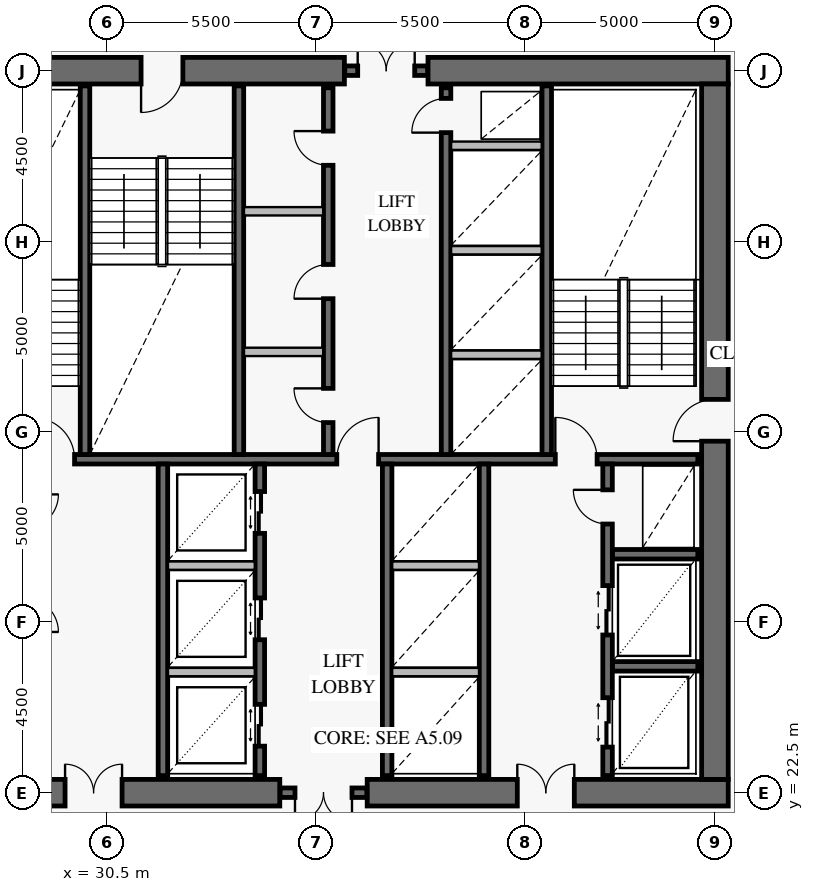
"""IFC4 building model, lengths in metres.
Left out: names, types, materials, properties, quantities, classifications, styles, units other than length and angle.
Written with IfcOpenShell. Run it as: python <this file> out.ifc"""

import sys

from ifc_helpers import new_model, si_unit, direction, frame, frame_2d, origin, place, context, subcontext, project, spatial, rectangle, extrude, element, fill, save


model = new_model("IFC4")
c1 = context("Model", 3, precision=1e-05, world=origin(), true_north=direction((0.0, 1.0)))
c2 = subcontext(c1, "Body", "Model", "MODEL_VIEW")
j1 = project(units=[si_unit("LENGTHUNIT", "METRE"), si_unit("PLANEANGLEUNIT", "RADIAN")], contexts=[c1])
p1 = place(None, origin())
s1 = spatial("IfcSite", under=j1, at=p1, CompositionType="ELEMENT")
p2 = place(p1, origin())
s2 = spatial("IfcBuilding", under=s1, at=p2, CompositionType="ELEMENT")
p3 = place(p2, frame((0.0, 0.0, 138.0)))
s3 = spatial("IfcBuildingStorey", under=s2, at=p3, CompositionType="ELEMENT", Elevation=138.0)
p4 = place(p3, frame((25.15, 22.5, 0.0), z_axis=(0.0, 0.0, 1.0), x_axis=(1.0, 0.0, 0.0)))
e1 = element("IfcWall", 1, at=p4, inside=s3, PredefinedType="SHEAR", context=c2, shape_type="SweptSolid", body=[
    extrude(rectangle(XDim=9.9, YDim=0.7, at=frame_2d((4.95, 0.0))), origin(), (0.0, 0.0, 1.0), 3.8),
])
p5 = place(p4, frame((4.25, 0.0, 0.0)))
e2 = element("IfcOpeningElement", 2, at=p5, cuts=e1, PredefinedType="OPENING", context=c2, shape_type="SweptSolid", body=[
    extrude(rectangle(XDim=1.5, YDim=2.15, at=frame_2d((0.75, 1.075))), frame((0.0, 0.362, 0.0), z_axis=(0.0, -1.0, 0.0), x_axis=(1.0, 0.0, 0.0)), (0.0, 0.0, 1.0), 0.724),
])
p6 = place(p3, frame((37.35, 22.5, 0.0), z_axis=(0.0, 0.0, 1.0), x_axis=(1.0, 0.0, 0.0)))
e3 = element("IfcWall", 3, at=p6, inside=s3, PredefinedType="SHEAR", context=c2, shape_type="SweptSolid", body=[
    extrude(rectangle(XDim=9.5, YDim=0.7, at=frame_2d((4.75, 0.0))), origin(), (0.0, 0.0, 1.0), 3.8),
])
p7 = place(p6, frame((3.95, 0.0, 0.0)))
e4 = element("IfcOpeningElement", 4, at=p7, cuts=e3, PredefinedType="OPENING", context=c2, shape_type="SweptSolid", body=[
    extrude(rectangle(XDim=1.5, YDim=2.15, at=frame_2d((0.75, 1.075))), frame((0.0, 0.362, 0.0), z_axis=(0.0, -1.0, 0.0), x_axis=(1.0, 0.0, 0.0)), (0.0, 0.0, 1.0), 0.724),
])
p8 = place(p3, frame((46.85, 41.5, 0.0), z_axis=(0.0, 0.0, 1.0), x_axis=(-1.0, 0.0, 0.0)))
e5 = element("IfcWall", 5, at=p8, inside=s3, PredefinedType="SHEAR", context=c2, shape_type="SweptSolid", body=[
    extrude(rectangle(XDim=7.9, YDim=0.7, at=frame_2d((3.95, 0.0))), origin(), (0.0, 0.0, 1.0), 3.8),
])
p9 = place(p3, frame((36.75, 41.5, 0.0), z_axis=(0.0, 0.0, 1.0), x_axis=(-1.0, 0.0, 0.0)))
e6 = element("IfcWall", 6, at=p9, inside=s3, PredefinedType="SHEAR", context=c2, shape_type="SweptSolid", body=[
    extrude(rectangle(XDim=11.6, YDim=0.7, at=frame_2d((5.8, 0.0))), origin(), (0.0, 0.0, 1.0), 3.8),
])
p10 = place(p9, frame((4.25, 0.0, 0.0)))
e7 = element("IfcOpeningElement", 7, at=p10, cuts=e6, PredefinedType="OPENING", context=c2, shape_type="SweptSolid", body=[
    extrude(rectangle(XDim=1.1, YDim=2.15, at=frame_2d((0.55, 1.075))), frame((0.0, 0.362, 0.0), z_axis=(0.0, -1.0, 0.0), x_axis=(1.0, 0.0, 0.0)), (0.0, 0.0, 1.0), 0.724),
])
p11 = place(p3, frame((46.5, 22.85, 0.0), z_axis=(0.0, 0.0, 1.0), x_axis=(0.0, 1.0, 0.0)))
e8 = element("IfcWall", 8, at=p11, inside=s3, PredefinedType="SHEAR", context=c2, shape_type="SweptSolid", body=[
    extrude(rectangle(XDim=18.3, YDim=0.7, at=frame_2d((9.15, 0.0))), origin(), (0.0, 0.0, 1.0), 3.8),
])
p12 = place(p11, frame((8.9, 0.0, 0.0)))
e9 = element("IfcOpeningElement", 9, at=p12, cuts=e8, PredefinedType="OPENING", context=c2, shape_type="SweptSolid", body=[
    extrude(rectangle(XDim=1.1, YDim=2.15, at=frame_2d((0.55, 1.075))), frame((0.0, 0.362, 0.0), z_axis=(0.0, -1.0, 0.0), x_axis=(1.0, 0.0, 0.0)), (0.0, 0.0, 1.0), 0.724),
])
p13 = place(p3, frame((35.06, 22.5, 0.0), z_axis=(0.0, 0.0, 1.0), x_axis=(1.0, 0.0, 0.0)))
e10 = element("IfcWall", 10, at=p13, inside=s3, PredefinedType="SOLIDWALL", context=c2, shape_type="SweptSolid", body=[
    extrude(rectangle(XDim=2.28, YDim=0.25, at=frame_2d((1.14, 0.0))), origin(), (0.0, 0.0, 1.0), 3.8),
])
p14 = place(p13, frame((0.39, 0.0, 0.0)))
e11 = element("IfcOpeningElement", 11, at=p14, cuts=e10, PredefinedType="OPENING", context=c2, shape_type="SweptSolid", body=[
    extrude(rectangle(XDim=1.5, YDim=2.15, at=frame_2d((0.75, 1.075))), frame((0.0, 0.137, 0.0), z_axis=(0.0, -1.0, 0.0), x_axis=(1.0, 0.0, 0.0)), (0.0, 0.0, 1.0), 0.274),
])
p15 = place(p3, frame((36.76, 41.5, 0.0), z_axis=(0.0, 0.0, 1.0), x_axis=(1.0, 0.0, 0.0)))
e12 = element("IfcWall", 12, at=p15, inside=s3, PredefinedType="SOLIDWALL", context=c2, shape_type="SweptSolid", body=[
    extrude(rectangle(XDim=2.18, YDim=0.25, at=frame_2d((1.09, 0.0))), origin(), (0.0, 0.0, 1.0), 3.8),
])
p16 = place(p15, frame((0.34, 0.0, 0.0)))
e13 = element("IfcOpeningElement", 13, at=p16, cuts=e12, PredefinedType="OPENING", context=c2, shape_type="SweptSolid", body=[
    extrude(rectangle(XDim=1.5, YDim=2.15, at=frame_2d((0.75, 1.075))), frame((0.0, 0.137, 0.0), z_axis=(0.0, -1.0, 0.0), x_axis=(1.0, 0.0, 0.0)), (0.0, 0.0, 1.0), 0.274),
])
p17 = place(p3, frame((25.95, 31.275, 0.0), z_axis=(0.0, 0.0, 1.0), x_axis=(1.0, 0.0, 0.0)))
e14 = element("IfcWall", 14, at=p17, inside=s3, PredefinedType="SOLIDWALL", context=c2, shape_type="SweptSolid", body=[
    extrude(rectangle(XDim=20.1, YDim=0.25, at=frame_2d((10.05, 0.0))), origin(), (0.0, 0.0, 1.0), 3.8),
])
p18 = place(p17, frame((2.6, 0.0, 0.0)))
e15 = element("IfcOpeningElement", 15, at=p18, cuts=e14, PredefinedType="OPENING", context=c2, shape_type="SweptSolid", body=[
    extrude(rectangle(XDim=1.1, YDim=2.15, at=frame_2d((0.55, 1.075))), frame((0.0, 0.137, 0.0), z_axis=(0.0, -1.0, 0.0), x_axis=(1.0, 0.0, 0.0)), (0.0, 0.0, 1.0), 0.274),
])
p19 = place(p17, frame((10.6, 0.0, 0.0)))
e16 = element("IfcOpeningElement", 16, at=p19, cuts=e14, PredefinedType="OPENING", context=c2, shape_type="SweptSolid", body=[
    extrude(rectangle(XDim=1.1, YDim=2.15, at=frame_2d((0.55, 1.075))), frame((0.0, 0.137, 0.0), z_axis=(0.0, -1.0, 0.0), x_axis=(1.0, 0.0, 0.0)), (0.0, 0.0, 1.0), 0.274),
])
p20 = place(p17, frame((16.35, 0.0, 0.0)))
e17 = element("IfcOpeningElement", 17, at=p20, cuts=e14, PredefinedType="OPENING", context=c2, shape_type="SweptSolid", body=[
    extrude(rectangle(XDim=1.1, YDim=2.15, at=frame_2d((0.55, 1.075))), frame((0.0, 0.137, 0.0), z_axis=(0.0, -1.0, 0.0), x_axis=(1.0, 0.0, 0.0)), (0.0, 0.0, 1.0), 0.274),
])
for number, where, z_axis, x_axis in (
    (18, (29.925, 31.4, 0.0), (0.0, 0.0, 1.0), (0.0, 1.0, 0.0)),
    (19, (33.975, 31.4, 0.0), (0.0, 0.0, 1.0), (0.0, 1.0, 0.0)),
    (20, (42.075, 31.4, 0.0), (0.0, 0.0, 1.0), (0.0, 1.0, 0.0)),
):
    element("IfcWall", number, at=place(p3, frame(where, z_axis=z_axis, x_axis=x_axis)), inside=s3, PredefinedType="SOLIDWALL", context=c2, shape_type="SweptSolid", body=[
        extrude(rectangle(XDim=9.7, YDim=0.25, at=frame_2d((4.85, 0.0))), origin(), (0.0, 0.0, 1.0), 3.8),
    ])
p21 = place(p3, frame((36.325, 31.4, 0.0), z_axis=(0.0, 0.0, 1.0), x_axis=(0.0, 1.0, 0.0)))
e21 = element("IfcWall", 21, at=p21, inside=s3, PredefinedType="SOLIDWALL", context=c2, shape_type="SweptSolid", body=[
    extrude(rectangle(XDim=9.65, YDim=0.25, at=frame_2d((4.825, 0.0))), origin(), (0.0, 0.0, 1.0), 3.8),
])
p22 = place(p21, frame((0.84, 0.0, 0.0)))
e22 = element("IfcOpeningElement", 22, at=p22, cuts=e21, PredefinedType="OPENING", context=c2, shape_type="SweptSolid", body=[
    extrude(rectangle(XDim=0.9, YDim=2.1, at=frame_2d((0.45, 1.05))), frame((0.0, 0.137, 0.0), z_axis=(0.0, -1.0, 0.0), x_axis=(1.0, 0.0, 0.0)), (0.0, 0.0, 1.0), 0.274),
])
p23 = place(p21, frame((4.1, 0.0, 0.0)))
e23 = element("IfcOpeningElement", 23, at=p23, cuts=e21, PredefinedType="OPENING", context=c2, shape_type="SweptSolid", body=[
    extrude(rectangle(XDim=0.9, YDim=2.1, at=frame_2d((0.45, 1.05))), frame((0.0, 0.137, 0.0), z_axis=(0.0, -1.0, 0.0), x_axis=(1.0, 0.0, 0.0)), (0.0, 0.0, 1.0), 0.274),
])
p24 = place(p21, frame((7.61, 0.0, 0.0)))
e24 = element("IfcOpeningElement", 24, at=p24, cuts=e21, PredefinedType="OPENING", context=c2, shape_type="SweptSolid", body=[
    extrude(rectangle(XDim=0.9, YDim=2.1, at=frame_2d((0.45, 1.05))), frame((0.0, 0.137, 0.0), z_axis=(0.0, -1.0, 0.0), x_axis=(1.0, 0.0, 0.0)), (0.0, 0.0, 1.0), 0.274),
])
p25 = place(p3, frame((39.425, 31.4, 0.0), z_axis=(0.0, 0.0, 1.0), x_axis=(0.0, 1.0, 0.0)))
e25 = element("IfcWall", 25, at=p25, inside=s3, PredefinedType="SOLIDWALL", context=c2, shape_type="SweptSolid", body=[
    extrude(rectangle(XDim=9.65, YDim=0.25, at=frame_2d((4.825, 0.0))), origin(), (0.0, 0.0, 1.0), 3.8),
])
p26 = place(p25, frame((8.47, 0.0, 0.0)))
e26 = element("IfcOpeningElement", 26, at=p26, cuts=e25, PredefinedType="OPENING", context=c2, shape_type="SweptSolid", body=[
    extrude(rectangle(XDim=0.9, YDim=2.1, at=frame_2d((0.45, 1.05))), frame((0.0, 0.137, 0.0), z_axis=(0.0, -1.0, 0.0), x_axis=(1.0, 0.0, 0.0)), (0.0, 0.0, 1.0), 0.274),
])
p27 = place(p3, frame((31.975, 22.95, 0.0), z_axis=(0.0, 0.0, 1.0), x_axis=(0.0, 1.0, 0.0)))
e27 = element("IfcWall", 27, at=p27, inside=s3, PredefinedType="SOLIDWALL", context=c2, shape_type="SweptSolid", body=[
    extrude(rectangle(XDim=8.2, YDim=0.25, at=frame_2d((4.1, 0.0))), origin(), (0.0, 0.0, 1.0), 3.8),
])
p28 = place(p3, frame((34.525, 22.95, 0.0), z_axis=(0.0, 0.0, 1.0), x_axis=(0.0, 1.0, 0.0)))
e28 = element("IfcWall", 28, at=p28, inside=s3, PredefinedType="SOLIDWALL", context=c2, shape_type="SweptSolid", body=[
    extrude(rectangle(XDim=8.2, YDim=0.25, at=frame_2d((4.1, 0.0))), origin(), (0.0, 0.0, 1.0), 3.8),
])
p29 = place(p28, frame((0.775, 0.0, 0.0)))
e29 = element("IfcOpeningElement", 29, at=p29, cuts=e28, PredefinedType="OPENING", context=c2, shape_type="SweptSolid", body=[
    extrude(rectangle(XDim=1.1, YDim=2.2, at=frame_2d((0.55, 1.1))), frame((0.0, 0.137, 0.0), z_axis=(0.0, -1.0, 0.0), x_axis=(1.0, 0.0, 0.0)), (0.0, 0.0, 1.0), 0.274),
])
p30 = place(p28, frame((3.575, 0.0, 0.0)))
e30 = element("IfcOpeningElement", 30, at=p30, cuts=e28, PredefinedType="OPENING", context=c2, shape_type="SweptSolid", body=[
    extrude(rectangle(XDim=1.1, YDim=2.2, at=frame_2d((0.55, 1.1))), frame((0.0, 0.137, 0.0), z_axis=(0.0, -1.0, 0.0), x_axis=(1.0, 0.0, 0.0)), (0.0, 0.0, 1.0), 0.274),
])
p31 = place(p28, frame((6.375, 0.0, 0.0)))
e31 = element("IfcOpeningElement", 31, at=p31, cuts=e28, PredefinedType="OPENING", context=c2, shape_type="SweptSolid", body=[
    extrude(rectangle(XDim=1.1, YDim=2.2, at=frame_2d((0.55, 1.1))), frame((0.0, 0.137, 0.0), z_axis=(0.0, -1.0, 0.0), x_axis=(1.0, 0.0, 0.0)), (0.0, 0.0, 1.0), 0.274),
])
for number, where, z_axis, x_axis in (
    (32, (37.875, 22.95, 0.0), (0.0, 0.0, 1.0), (0.0, 1.0, 0.0)),
    (33, (40.425, 22.95, 0.0), (0.0, 0.0, 1.0), (0.0, 1.0, 0.0)),
):
    element("IfcWall", number, at=place(p3, frame(where, z_axis=z_axis, x_axis=x_axis)), inside=s3, PredefinedType="SOLIDWALL", context=c2, shape_type="SweptSolid", body=[
        extrude(rectangle(XDim=8.2, YDim=0.25, at=frame_2d((4.1, 0.0))), origin(), (0.0, 0.0, 1.0), 3.8),
    ])
for number, where, z_axis, x_axis in (
    (34, (43.8, 25.825, 0.0), (0.0, 0.0, 1.0), (1.0, 0.0, 0.0)),
    (35, (43.8, 28.775, 0.0), (0.0, 0.0, 1.0), (1.0, 0.0, 0.0)),
):
    element("IfcWall", number, at=place(p3, frame(where, z_axis=z_axis, x_axis=x_axis)), inside=s3, PredefinedType="SOLIDWALL", context=c2, shape_type="SweptSolid", body=[
        extrude(rectangle(XDim=2.25, YDim=0.25, at=frame_2d((1.125, 0.0))), origin(), (0.0, 0.0, 1.0), 3.8),
    ])
p32 = place(p3, frame((43.675, 22.95, 0.0), z_axis=(0.0, 0.0, 1.0), x_axis=(0.0, 1.0, 0.0)))
e36 = element("IfcWall", 36, at=p32, inside=s3, PredefinedType="SOLIDWALL", context=c2, shape_type="SweptSolid", body=[
    extrude(rectangle(XDim=8.2, YDim=0.25, at=frame_2d((4.1, 0.0))), origin(), (0.0, 0.0, 1.0), 3.8),
])
p33 = place(p32, frame((0.75, 0.0, 0.0)))
e37 = element("IfcOpeningElement", 37, at=p33, cuts=e36, PredefinedType="OPENING", context=c2, shape_type="SweptSolid", body=[
    extrude(rectangle(XDim=1.3, YDim=2.3, at=frame_2d((0.65, 1.15))), frame((0.0, 0.137, 0.0), z_axis=(0.0, -1.0, 0.0), x_axis=(1.0, 0.0, 0.0)), (0.0, 0.0, 1.0), 0.274),
])
p34 = place(p32, frame((3.7, 0.0, 0.0)))
e38 = element("IfcOpeningElement", 38, at=p34, cuts=e36, PredefinedType="OPENING", context=c2, shape_type="SweptSolid", body=[
    extrude(rectangle(XDim=1.3, YDim=2.3, at=frame_2d((0.65, 1.15))), frame((0.0, 0.137, 0.0), z_axis=(0.0, -1.0, 0.0), x_axis=(1.0, 0.0, 0.0)), (0.0, 0.0, 1.0), 0.274),
])
p35 = place(p32, frame((6.62, 0.0, 0.0)))
e39 = element("IfcOpeningElement", 39, at=p35, cuts=e36, PredefinedType="OPENING", context=c2, shape_type="SweptSolid", body=[
    extrude(rectangle(XDim=0.9, YDim=2.1, at=frame_2d((0.45, 1.05))), frame((0.0, 0.137, 0.0), z_axis=(0.0, -1.0, 0.0), x_axis=(1.0, 0.0, 0.0)), (0.0, 0.0, 1.0), 0.274),
])
for number, where, z_axis, x_axis in (
    (40, (34.108, 34.1, 0.0), (0.0, 0.0, 1.0), (1.0, 0.0, 0.0)),
    (41, (34.108, 37.8, 0.0), (0.0, 0.0, 1.0), (1.0, 0.0, 0.0)),
):
    element("IfcWall", number, at=place(p3, frame(where, z_axis=z_axis, x_axis=x_axis)), inside=s3, PredefinedType="PARTITIONING", context=c2, shape_type="SweptSolid", body=[
        extrude(rectangle(XDim=2.084, YDim=0.22, at=frame_2d((1.042, 0.0))), origin(), (0.0, 0.0, 1.0), 3.55),
    ])
for number, where, z_axis, x_axis in (
    (42, (39.558, 34.025, 0.0), (0.0, 0.0, 1.0), (1.0, 0.0, 0.0)),
    (43, (39.558, 36.775, 0.0), (0.0, 0.0, 1.0), (1.0, 0.0, 0.0)),
    (44, (39.558, 39.525, 0.0), (0.0, 0.0, 1.0), (1.0, 0.0, 0.0)),
):
    element("IfcWall", number, at=place(p3, frame(where, z_axis=z_axis, x_axis=x_axis)), inside=s3, PredefinedType="PARTITIONING", context=c2, shape_type="SweptSolid", body=[
        extrude(rectangle(XDim=2.384, YDim=0.22, at=frame_2d((1.192, 0.0))), origin(), (0.0, 0.0, 1.0), 3.55),
    ])
for number, where, z_axis, x_axis in (
    (45, (32.108, 25.675, 0.0), (0.0, 0.0, 1.0), (1.0, 0.0, 0.0)),
    (46, (32.108, 28.475, 0.0), (0.0, 0.0, 1.0), (1.0, 0.0, 0.0)),
):
    element("IfcWall", number, at=place(p3, frame(where, z_axis=z_axis, x_axis=x_axis)), inside=s3, PredefinedType="PARTITIONING", context=c2, shape_type="SweptSolid", body=[
        extrude(rectangle(XDim=2.284, YDim=0.22, at=frame_2d((1.142, 0.0))), origin(), (0.0, 0.0, 1.0), 3.55),
    ])
for number, where, z_axis, x_axis in (
    (47, (38.008, 25.675, 0.0), (0.0, 0.0, 1.0), (1.0, 0.0, 0.0)),
    (48, (38.008, 28.475, 0.0), (0.0, 0.0, 1.0), (1.0, 0.0, 0.0)),
):
    element("IfcWall", number, at=place(p3, frame(where, z_axis=z_axis, x_axis=x_axis)), inside=s3, PredefinedType="PARTITIONING", context=c2, shape_type="SweptSolid", body=[
        extrude(rectangle(XDim=2.284, YDim=0.22, at=frame_2d((1.142, 0.0))), origin(), (0.0, 0.0, 1.0), 3.55),
    ])
p36 = place(p12, origin())
e49 = element("IfcDoor", 49, at=p36, inside=s3, OperationType="SINGLE_SWING_LEFT", PredefinedType="USERDEFINED", context=c2, shape_type="SweptSolid", body=[
    extrude(rectangle(XDim=1.1, YDim=2.15, at=frame_2d((0.55, 1.075))), frame((0.0, 0.025, 0.0), z_axis=(0.0, -1.0, 0.0), x_axis=(1.0, 0.0, 0.0)), (0.0, 0.0, 1.0), 0.05),
])
fill(e9, e49)
p37 = place(p10, origin())
e50 = element("IfcDoor", 50, at=p37, inside=s3, OperationType="SINGLE_SWING_RIGHT", PredefinedType="USERDEFINED", context=c2, shape_type="SweptSolid", body=[
    extrude(rectangle(XDim=1.1, YDim=2.15, at=frame_2d((0.55, 1.075))), frame((0.0, 0.025, 0.0), z_axis=(0.0, -1.0, 0.0), x_axis=(1.0, 0.0, 0.0)), (0.0, 0.0, 1.0), 0.05),
])
fill(e7, e50)
p38 = place(p5, origin())
e51 = element("IfcDoor", 51, at=p38, inside=s3, OperationType="DOUBLE_DOOR_SINGLE_SWING", PredefinedType="DOOR", context=c2, shape_type="SweptSolid", body=[
    extrude(rectangle(XDim=1.5, YDim=2.15, at=frame_2d((0.75, 1.075))), frame((0.0, 0.025, 0.0), z_axis=(0.0, -1.0, 0.0), x_axis=(1.0, 0.0, 0.0)), (0.0, 0.0, 1.0), 0.05),
])
fill(e2, e51)
p39 = place(p7, origin())
e52 = element("IfcDoor", 52, at=p39, inside=s3, OperationType="DOUBLE_DOOR_SINGLE_SWING", PredefinedType="DOOR", context=c2, shape_type="SweptSolid", body=[
    extrude(rectangle(XDim=1.5, YDim=2.15, at=frame_2d((0.75, 1.075))), frame((0.0, 0.025, 0.0), z_axis=(0.0, -1.0, 0.0), x_axis=(1.0, 0.0, 0.0)), (0.0, 0.0, 1.0), 0.05),
])
fill(e4, e52)
p40 = place(p14, frame((1.5, 0.0, 0.0), z_axis=(0.0, 0.0, 1.0), x_axis=(-1.0, 0.0, 0.0)))
e53 = element("IfcDoor", 53, at=p40, inside=s3, OperationType="DOUBLE_DOOR_SINGLE_SWING", PredefinedType="DOOR", context=c2, shape_type="SweptSolid", body=[
    extrude(rectangle(XDim=1.5, YDim=2.15, at=frame_2d((0.75, 1.075))), frame((0.0, 0.025, 0.0), z_axis=(0.0, -1.0, 0.0), x_axis=(1.0, 0.0, 0.0)), (0.0, 0.0, 1.0), 0.05),
])
fill(e11, e53)
p41 = place(p16, origin())
e54 = element("IfcDoor", 54, at=p41, inside=s3, OperationType="DOUBLE_DOOR_SINGLE_SWING", PredefinedType="DOOR", context=c2, shape_type="SweptSolid", body=[
    extrude(rectangle(XDim=1.5, YDim=2.15, at=frame_2d((0.75, 1.075))), frame((0.0, 0.025, 0.0), z_axis=(0.0, -1.0, 0.0), x_axis=(1.0, 0.0, 0.0)), (0.0, 0.0, 1.0), 0.05),
])
fill(e13, e54)
p42 = place(p18, origin())
e55 = element("IfcDoor", 55, at=p42, inside=s3, OperationType="SINGLE_SWING_LEFT", PredefinedType="USERDEFINED", context=c2, shape_type="SweptSolid", body=[
    extrude(rectangle(XDim=1.1, YDim=2.15, at=frame_2d((0.55, 1.075))), frame((0.0, 0.025, 0.0), z_axis=(0.0, -1.0, 0.0), x_axis=(1.0, 0.0, 0.0)), (0.0, 0.0, 1.0), 0.05),
])
fill(e15, e55)
p43 = place(p19, origin())
e56 = element("IfcDoor", 56, at=p43, inside=s3, OperationType="SINGLE_SWING_RIGHT", PredefinedType="USERDEFINED", context=c2, shape_type="SweptSolid", body=[
    extrude(rectangle(XDim=1.1, YDim=2.15, at=frame_2d((0.55, 1.075))), frame((0.0, 0.025, 0.0), z_axis=(0.0, -1.0, 0.0), x_axis=(1.0, 0.0, 0.0)), (0.0, 0.0, 1.0), 0.05),
])
fill(e16, e56)
p44 = place(p20, origin())
e57 = element("IfcDoor", 57, at=p44, inside=s3, OperationType="SINGLE_SWING_LEFT", PredefinedType="USERDEFINED", context=c2, shape_type="SweptSolid", body=[
    extrude(rectangle(XDim=1.1, YDim=2.15, at=frame_2d((0.55, 1.075))), frame((0.0, 0.025, 0.0), z_axis=(0.0, -1.0, 0.0), x_axis=(1.0, 0.0, 0.0)), (0.0, 0.0, 1.0), 0.05),
])
fill(e17, e57)
p45 = place(p22, origin())
e58 = element("IfcDoor", 58, at=p45, inside=s3, OperationType="SINGLE_SWING_RIGHT", PredefinedType="DOOR", context=c2, shape_type="SweptSolid", body=[
    extrude(rectangle(XDim=0.9, YDim=2.1, at=frame_2d((0.45, 1.05))), frame((0.0, 0.025, 0.0), z_axis=(0.0, -1.0, 0.0), x_axis=(1.0, 0.0, 0.0)), (0.0, 0.0, 1.0), 0.05),
])
fill(e22, e58)
p46 = place(p23, origin())
e59 = element("IfcDoor", 59, at=p46, inside=s3, OperationType="SINGLE_SWING_LEFT", PredefinedType="DOOR", context=c2, shape_type="SweptSolid", body=[
    extrude(rectangle(XDim=0.9, YDim=2.1, at=frame_2d((0.45, 1.05))), frame((0.0, 0.025, 0.0), z_axis=(0.0, -1.0, 0.0), x_axis=(1.0, 0.0, 0.0)), (0.0, 0.0, 1.0), 0.05),
])
fill(e23, e59)
p47 = place(p24, origin())
e60 = element("IfcDoor", 60, at=p47, inside=s3, OperationType="SINGLE_SWING_RIGHT", PredefinedType="DOOR", context=c2, shape_type="SweptSolid", body=[
    extrude(rectangle(XDim=0.9, YDim=2.1, at=frame_2d((0.45, 1.05))), frame((0.0, 0.025, 0.0), z_axis=(0.0, -1.0, 0.0), x_axis=(1.0, 0.0, 0.0)), (0.0, 0.0, 1.0), 0.05),
])
fill(e24, e60)
p48 = place(p26, origin())
e61 = element("IfcDoor", 61, at=p48, inside=s3, OperationType="SINGLE_SWING_LEFT", PredefinedType="DOOR", context=c2, shape_type="SweptSolid", body=[
    extrude(rectangle(XDim=0.9, YDim=2.1, at=frame_2d((0.45, 1.05))), frame((0.0, 0.025, 0.0), z_axis=(0.0, -1.0, 0.0), x_axis=(1.0, 0.0, 0.0)), (0.0, 0.0, 1.0), 0.05),
])
fill(e26, e61)
p49 = place(p29, frame((1.1, 0.0, 0.0), z_axis=(0.0, 0.0, 1.0), x_axis=(-1.0, 0.0, 0.0)))
e62 = element("IfcDoor", 62, at=p49, inside=s3, OperationType="DOUBLE_DOOR_SLIDING", PredefinedType="DOOR", context=c2, shape_type="SweptSolid", body=[
    extrude(rectangle(XDim=1.1, YDim=2.2, at=frame_2d((0.55, 1.1))), frame((0.0, 0.025, 0.0), z_axis=(0.0, -1.0, 0.0), x_axis=(1.0, 0.0, 0.0)), (0.0, 0.0, 1.0), 0.05),
])
fill(e29, e62)
p50 = place(p30, frame((1.1, 0.0, 0.0), z_axis=(0.0, 0.0, 1.0), x_axis=(-1.0, 0.0, 0.0)))
e63 = element("IfcDoor", 63, at=p50, inside=s3, OperationType="DOUBLE_DOOR_SLIDING", PredefinedType="DOOR", context=c2, shape_type="SweptSolid", body=[
    extrude(rectangle(XDim=1.1, YDim=2.2, at=frame_2d((0.55, 1.1))), frame((0.0, 0.025, 0.0), z_axis=(0.0, -1.0, 0.0), x_axis=(1.0, 0.0, 0.0)), (0.0, 0.0, 1.0), 0.05),
])
fill(e30, e63)
p51 = place(p31, frame((1.1, 0.0, 0.0), z_axis=(0.0, 0.0, 1.0), x_axis=(-1.0, 0.0, 0.0)))
e64 = element("IfcDoor", 64, at=p51, inside=s3, OperationType="DOUBLE_DOOR_SLIDING", PredefinedType="DOOR", context=c2, shape_type="SweptSolid", body=[
    extrude(rectangle(XDim=1.1, YDim=2.2, at=frame_2d((0.55, 1.1))), frame((0.0, 0.025, 0.0), z_axis=(0.0, -1.0, 0.0), x_axis=(1.0, 0.0, 0.0)), (0.0, 0.0, 1.0), 0.05),
])
fill(e31, e64)
p52 = place(p33, origin())
e65 = element("IfcDoor", 65, at=p52, inside=s3, OperationType="DOUBLE_DOOR_SLIDING", PredefinedType="DOOR", context=c2, shape_type="SweptSolid", body=[
    extrude(rectangle(XDim=1.3, YDim=2.3, at=frame_2d((0.65, 1.15))), frame((0.0, 0.025, 0.0), z_axis=(0.0, -1.0, 0.0), x_axis=(1.0, 0.0, 0.0)), (0.0, 0.0, 1.0), 0.05),
])
fill(e37, e65)
p53 = place(p34, origin())
e66 = element("IfcDoor", 66, at=p53, inside=s3, OperationType="DOUBLE_DOOR_SLIDING", PredefinedType="DOOR", context=c2, shape_type="SweptSolid", body=[
    extrude(rectangle(XDim=1.3, YDim=2.3, at=frame_2d((0.65, 1.15))), frame((0.0, 0.025, 0.0), z_axis=(0.0, -1.0, 0.0), x_axis=(1.0, 0.0, 0.0)), (0.0, 0.0, 1.0), 0.05),
])
fill(e38, e66)
p54 = place(p35, origin())
e67 = element("IfcDoor", 67, at=p54, inside=s3, OperationType="SINGLE_SWING_RIGHT", PredefinedType="DOOR", context=c2, shape_type="SweptSolid", body=[
    extrude(rectangle(XDim=0.9, YDim=2.1, at=frame_2d((0.45, 1.05))), frame((0.0, 0.025, 0.0), z_axis=(0.0, -1.0, 0.0), x_axis=(1.0, 0.0, 0.0)), (0.0, 0.0, 1.0), 0.05),
])
fill(e39, e67)
save(model, sys.argv[1])
